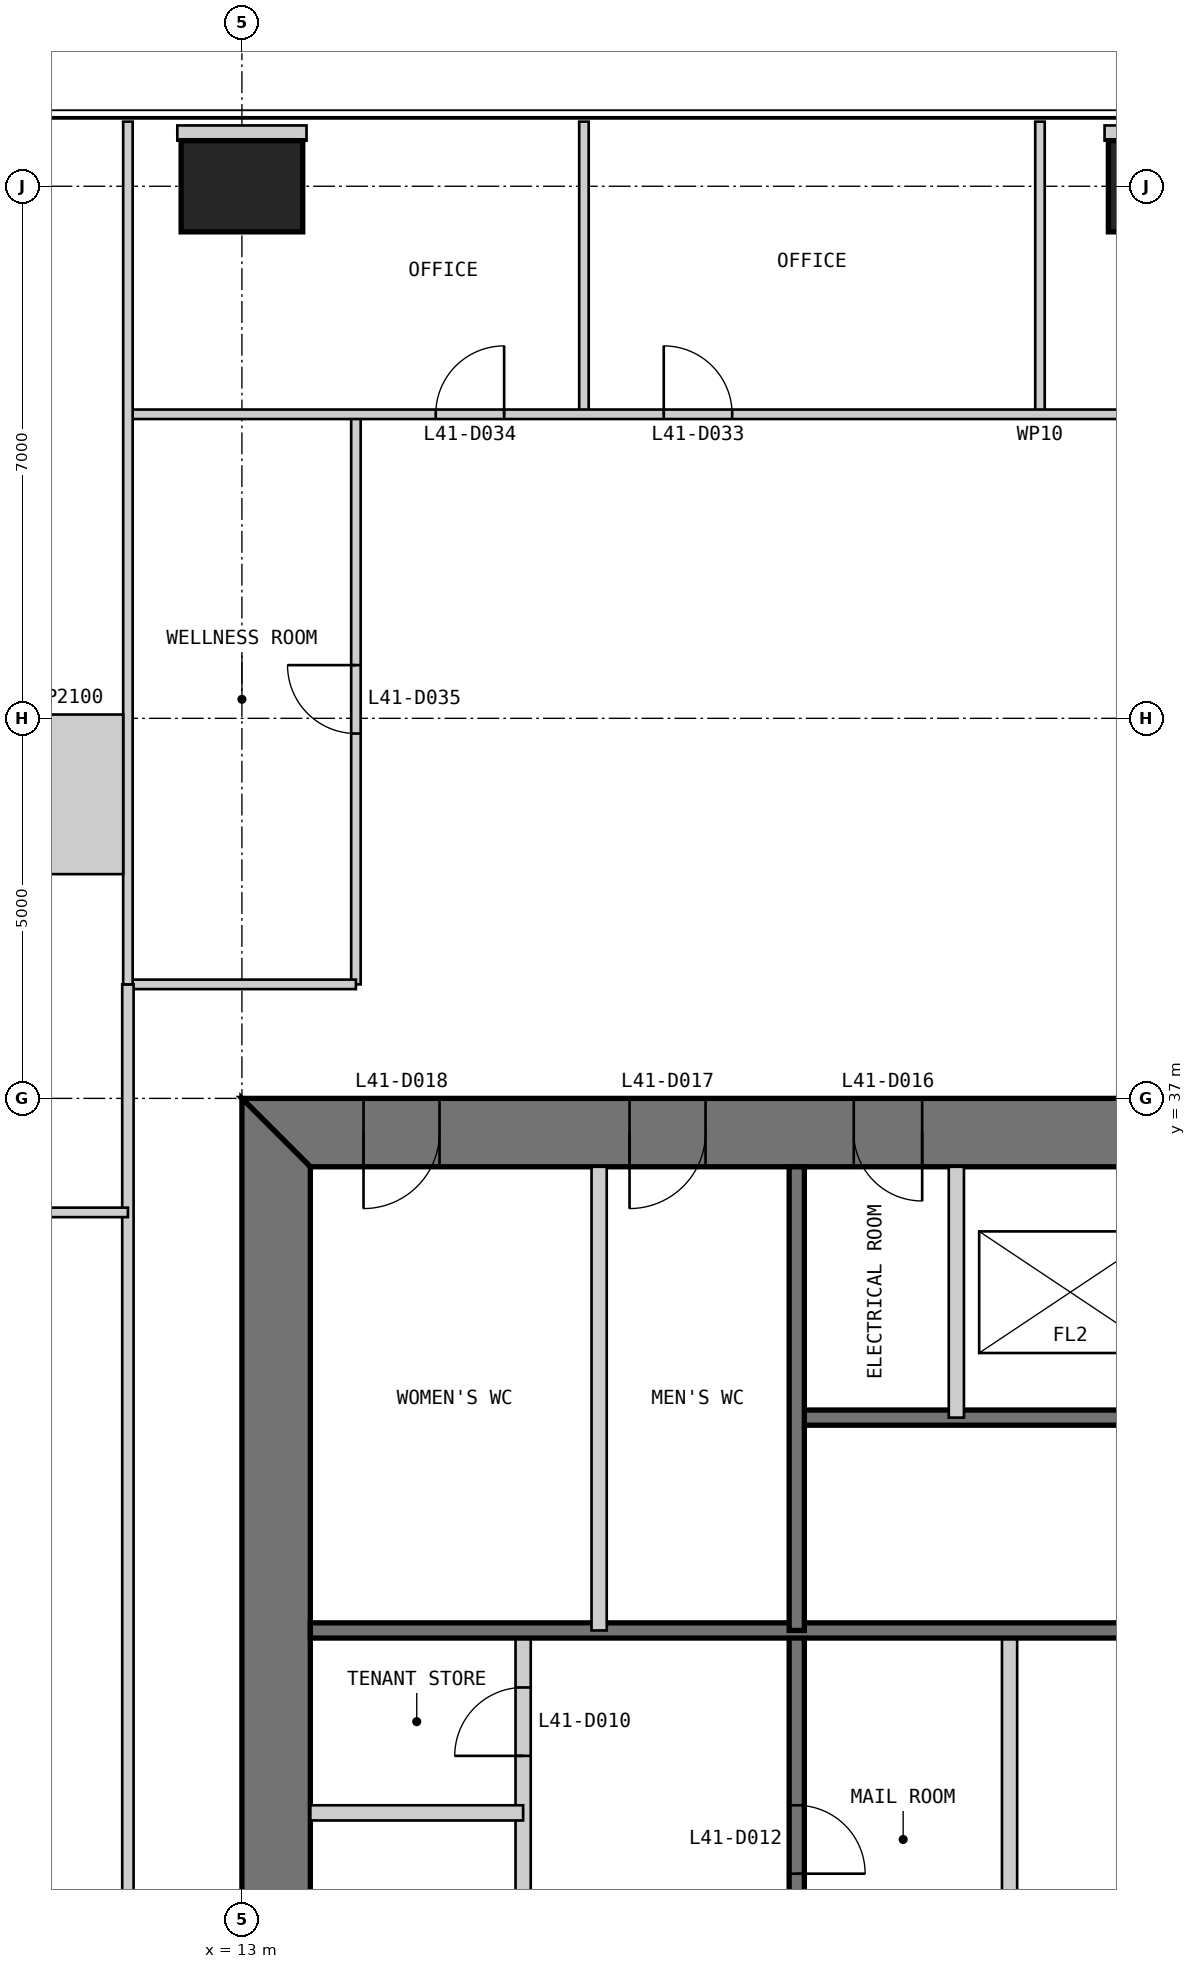
"""IFC4 building model, lengths in metres.
Left out: names, types, materials, properties, quantities, classifications, styles, units other than length and angle.
Written with IfcOpenShell. Run it as: python <this file> out.ifc"""

import sys

from ifc_helpers import new_model, si_unit, direction, frame, frame_2d, origin, origin_2d, place, context, subcontext, project, spatial, polyline, rectangle, outline, extrude, element, fill, save


model = new_model("IFC4")
c1 = context("Model", 3, precision=1e-05, world=origin(), true_north=direction((0.0, 1.0)))
c2 = subcontext(c1, "Body", "Model", "MODEL_VIEW")
j1 = project(units=[si_unit("LENGTHUNIT", "METRE"), si_unit("PLANEANGLEUNIT", "RADIAN")], contexts=[c1])
p1 = place(None, origin())
s1 = spatial("IfcSite", under=j1, at=p1, CompositionType="ELEMENT")
p2 = place(p1, origin())
s2 = spatial("IfcBuilding", under=s1, at=p2, CompositionType="ELEMENT")
p3 = place(p2, frame((0.0, 0.0, 177.8)))
s3 = spatial("IfcBuildingStorey", under=s2, at=p3, CompositionType="ELEMENT", Elevation=177.8)
p4 = place(p3, frame((25.0, 49.0, 0.0), z_axis=(0.0, 0.0, 1.0), x_axis=(1.0, 0.0, 0.0)))
e1 = element("IfcColumn", 1, at=p4, inside=s3, PredefinedType="COLUMN", context=c2, shape_type="SweptSolid", body=[
    extrude(rectangle(XDim=1.2, YDim=1.2, at=origin_2d()), origin(), (0.0, 0.0, 1.0), 4.0),
])
p5 = place(p3, frame((13.0, 49.0, 0.0), z_axis=(0.0, 0.0, 1.0), x_axis=(1.0, 0.0, 0.0)))
e2 = element("IfcColumn", 2, at=p5, inside=s3, PredefinedType="COLUMN", context=c2, shape_type="SweptSolid", body=[
    extrude(rectangle(XDim=1.6, YDim=1.2, at=origin_2d()), origin(), (0.0, 0.0, 1.0), 4.0),
])
p6 = place(p3, frame((37.0, 36.55, 0.0), z_axis=(0.0, 0.0, 1.0), x_axis=(-1.0, 0.0, 0.0)))
e3 = element("IfcWall", 3, at=p6, inside=s3, PredefinedType="SHEAR", context=c2, shape_type="SweptSolid", body=[
    extrude(outline(polyline([(0.0, -0.45), (24.0, -0.45), (23.1, 0.45), (0.9, 0.45), (0.0, -0.45)])), origin(), (0.0, 0.0, 1.0), 4.0),
])
p7 = place(p6, frame((4.9, 0.0, 0.0)))
e4 = element("IfcOpeningElement", 4, at=p7, cuts=e3, PredefinedType="OPENING", context=c2, shape_type="SweptSolid", body=[
    extrude(rectangle(XDim=1.0, YDim=2.2, at=frame_2d((0.5, 1.1))), frame((0.0, 0.46, 0.0), z_axis=(0.0, -1.0, 0.0), x_axis=(1.0, 0.0, 0.0)), (0.0, 0.0, 1.0), 0.92),
])
p8 = place(p6, frame((8.9, 0.0, 0.0)))
e5 = element("IfcOpeningElement", 5, at=p8, cuts=e3, PredefinedType="OPENING", context=c2, shape_type="SweptSolid", body=[
    extrude(rectangle(XDim=1.1, YDim=2.2, at=frame_2d((0.55, 1.1))), frame((0.0, 0.46, 0.0), z_axis=(0.0, -1.0, 0.0), x_axis=(1.0, 0.0, 0.0)), (0.0, 0.0, 1.0), 0.92),
])
p9 = place(p6, frame((15.05, 0.0, 0.0)))
e6 = element("IfcOpeningElement", 6, at=p9, cuts=e3, PredefinedType="OPENING", context=c2, shape_type="SweptSolid", body=[
    extrude(rectangle(XDim=0.9, YDim=2.2, at=frame_2d((0.45, 1.1))), frame((0.0, 0.46, 0.0), z_axis=(0.0, -1.0, 0.0), x_axis=(1.0, 0.0, 0.0)), (0.0, 0.0, 1.0), 0.92),
])
p10 = place(p6, frame((17.9, 0.0, 0.0)))
e7 = element("IfcOpeningElement", 7, at=p10, cuts=e3, PredefinedType="OPENING", context=c2, shape_type="SweptSolid", body=[
    extrude(rectangle(XDim=1.0, YDim=2.2, at=frame_2d((0.5, 1.1))), frame((0.0, 0.46, 0.0), z_axis=(0.0, -1.0, 0.0), x_axis=(1.0, 0.0, 0.0)), (0.0, 0.0, 1.0), 0.92),
])
p11 = place(p6, frame((21.4, 0.0, 0.0)))
e8 = element("IfcOpeningElement", 8, at=p11, cuts=e3, PredefinedType="OPENING", context=c2, shape_type="SweptSolid", body=[
    extrude(rectangle(XDim=1.0, YDim=2.2, at=frame_2d((0.5, 1.1))), frame((0.0, 0.46, 0.0), z_axis=(0.0, -1.0, 0.0), x_axis=(1.0, 0.0, 0.0)), (0.0, 0.0, 1.0), 0.92),
])
p12 = place(p3, frame((13.45, 36.1, 0.0), z_axis=(0.0, 0.0, 1.0), x_axis=(0.0, -1.0, 0.0)))
e9 = element("IfcWall", 9, at=p12, inside=s3, PredefinedType="SHEAR", context=c2, shape_type="SweptSolid", body=[
    extrude(outline(polyline([(-0.9, -0.45), (23.1, -0.45), (22.2, 0.45), (0.0, 0.45), (-0.9, -0.45)])), origin(), (0.0, 0.0, 1.0), 4.0),
])
p13 = place(p12, frame((20.2, 0.0, 0.0)))
e10 = element("IfcOpeningElement", 10, at=p13, cuts=e9, PredefinedType="OPENING", context=c2, shape_type="SweptSolid", body=[
    extrude(rectangle(XDim=1.0, YDim=2.2, at=frame_2d((0.5, 1.1))), frame((0.0, 0.46, 0.0), z_axis=(0.0, -1.0, 0.0), x_axis=(1.0, 0.0, 0.0)), (0.0, 0.0, 1.0), 0.92),
])
p14 = place(p12, frame((17.25, 0.0, 0.0)))
e11 = element("IfcOpeningElement", 11, at=p14, cuts=e9, PredefinedType="OPENING", context=c2, shape_type="SweptSolid", body=[
    extrude(rectangle(XDim=0.9, YDim=2.2, at=frame_2d((0.45, 1.1))), frame((0.0, 0.46, 0.0), z_axis=(0.0, -1.0, 0.0), x_axis=(1.0, 0.0, 0.0)), (0.0, 0.0, 1.0), 0.92),
])
p15 = place(p3, frame((16.7, 13.9, 0.0), z_axis=(0.0, 0.0, 1.0), x_axis=(0.0, 1.0, 0.0)))
e12 = element("IfcWall", 12, at=p15, inside=s3, PredefinedType="PARTITIONING", context=c2, shape_type="SweptSolid", body=[
    extrude(rectangle(XDim=16.1, YDim=0.2, at=frame_2d((8.05, 0.0))), origin(), (0.0, 0.0, 1.0), 3.8),
])
p16 = place(p15, frame((9.25, 0.0, 0.0)))
e13 = element("IfcOpeningElement", 13, at=p16, cuts=e12, PredefinedType="OPENING", context=c2, shape_type="SweptSolid", body=[
    extrude(rectangle(XDim=0.9, YDim=2.2, at=frame_2d((0.45, 1.1))), frame((0.0, 0.11, 0.0), z_axis=(0.0, -1.0, 0.0), x_axis=(1.0, 0.0, 0.0)), (0.0, 0.0, 1.0), 0.22),
])
p17 = place(p15, frame((14.45, 0.0, 0.0)))
e14 = element("IfcOpeningElement", 14, at=p17, cuts=e12, PredefinedType="OPENING", context=c2, shape_type="SweptSolid", body=[
    extrude(rectangle(XDim=0.9, YDim=2.2, at=frame_2d((0.45, 1.1))), frame((0.0, 0.11, 0.0), z_axis=(0.0, -1.0, 0.0), x_axis=(1.0, 0.0, 0.0)), (0.0, 0.0, 1.0), 0.22),
])
p18 = place(p3, frame((20.3, 13.9, 0.0), z_axis=(0.0, 0.0, 1.0), x_axis=(0.0, 1.0, 0.0)))
e15 = element("IfcWall", 15, at=p18, inside=s3, PredefinedType="SOLIDWALL", context=c2, shape_type="SweptSolid", body=[
    extrude(rectangle(XDim=16.1, YDim=0.2, at=frame_2d((8.05, 0.0))), origin(), (0.0, 0.0, 1.0), 3.8),
])
p19 = place(p18, frame((7.9, 0.0, 0.0)))
e16 = element("IfcOpeningElement", 16, at=p19, cuts=e15, PredefinedType="OPENING", context=c2, shape_type="SweptSolid", body=[
    extrude(rectangle(XDim=0.9, YDim=2.2, at=frame_2d((0.45, 1.1))), frame((0.0, 0.11, 0.0), z_axis=(0.0, -1.0, 0.0), x_axis=(1.0, 0.0, 0.0)), (0.0, 0.0, 1.0), 0.22),
])
p20 = place(p18, frame((12.9, 0.0, 0.0)))
e17 = element("IfcOpeningElement", 17, at=p20, cuts=e15, PredefinedType="OPENING", context=c2, shape_type="SweptSolid", body=[
    extrude(rectangle(XDim=0.9, YDim=2.2, at=frame_2d((0.45, 1.1))), frame((0.0, 0.11, 0.0), z_axis=(0.0, -1.0, 0.0), x_axis=(1.0, 0.0, 0.0)), (0.0, 0.0, 1.0), 0.22),
])
p21 = place(p3, frame((23.1, 20.0, 0.0), z_axis=(0.0, 0.0, 1.0), x_axis=(0.0, 1.0, 0.0)))
e18 = element("IfcWall", 18, at=p21, inside=s3, PredefinedType="PARTITIONING", context=c2, shape_type="SweptSolid", body=[
    extrude(rectangle(XDim=10.0, YDim=0.2, at=frame_2d((5.0, 0.0))), origin(), (0.0, 0.0, 1.0), 3.8),
])
p22 = place(p3, frame((13.9, 27.6, 0.0), z_axis=(0.0, 0.0, 1.0), x_axis=(1.0, 0.0, 0.0)))
e19 = element("IfcWall", 19, at=p22, inside=s3, PredefinedType="PARTITIONING", context=c2, shape_type="SweptSolid", body=[
    extrude(rectangle(XDim=2.8, YDim=0.2, at=frame_2d((1.4, 0.0))), origin(), (0.0, 0.0, 1.0), 3.8),
])
p23 = place(p3, frame((29.7, 32.8, 0.0), z_axis=(0.0, 0.0, 1.0), x_axis=(-1.0, 0.0, 0.0)))
e20 = element("IfcWall", 20, at=p23, inside=s3, PredefinedType="SOLIDWALL", context=c2, shape_type="SweptSolid", body=[
    extrude(rectangle(XDim=9.4, YDim=0.2, at=frame_2d((4.7, 0.0))), origin(), (0.0, 0.0, 1.0), 3.8),
])
p24 = place(p23, frame((0.25, 0.0, 0.0)))
e21 = element("IfcOpeningElement", 21, at=p24, cuts=e20, PredefinedType="OPENING", context=c2, shape_type="SweptSolid", body=[
    extrude(rectangle(XDim=1.0, YDim=2.2, at=frame_2d((0.5, 1.1))), frame((0.0, 0.11, 0.0), z_axis=(0.0, -1.0, 0.0), x_axis=(1.0, 0.0, 0.0)), (0.0, 0.0, 1.0), 0.22),
])
p25 = place(p3, frame((29.7, 30.0, 0.0), z_axis=(0.0, 0.0, 1.0), x_axis=(-1.0, 0.0, 0.0)))
e22 = element("IfcWall", 22, at=p25, inside=s3, PredefinedType="SOLIDWALL", context=c2, shape_type="SweptSolid", body=[
    extrude(rectangle(XDim=15.8, YDim=0.2, at=frame_2d((7.9, 0.0))), origin(), (0.0, 0.0, 1.0), 3.8),
])
p26 = place(p3, frame((22.4, 36.1, 0.0), z_axis=(0.0, 0.0, 1.0), x_axis=(0.0, -1.0, 0.0)))
e23 = element("IfcWall", 23, at=p26, inside=s3, PredefinedType="PARTITIONING", context=c2, shape_type="SweptSolid", body=[
    extrude(rectangle(XDim=3.3, YDim=0.2, at=frame_2d((1.65, 0.0))), origin(), (0.0, 0.0, 1.0), 3.8),
])
p27 = place(p3, frame((20.3, 36.1, 0.0), z_axis=(0.0, 0.0, 1.0), x_axis=(0.0, -1.0, 0.0)))
e24 = element("IfcWall", 24, at=p27, inside=s3, PredefinedType="SOLIDWALL", context=c2, shape_type="SweptSolid", body=[
    extrude(rectangle(XDim=6.1, YDim=0.2, at=frame_2d((3.05, 0.0))), origin(), (0.0, 0.0, 1.0), 3.8),
])
p28 = place(p3, frame((17.7, 36.1, 0.0), z_axis=(0.0, 0.0, 1.0), x_axis=(0.0, -1.0, 0.0)))
e25 = element("IfcWall", 25, at=p28, inside=s3, PredefinedType="PARTITIONING", context=c2, shape_type="SweptSolid", body=[
    extrude(rectangle(XDim=6.1, YDim=0.2, at=frame_2d((3.05, 0.0))), origin(), (0.0, 0.0, 1.0), 3.8),
])
for number, where, z_axis, x_axis in (
    (26, (23.5, 49.85, 0.0), (0.0, 0.0, 1.0), (0.0, -1.0, 0.0)),
    (27, (17.5, 49.85, 0.0), (0.0, 0.0, 1.0), (0.0, -1.0, 0.0)),
):
    element("IfcWall", number, at=place(p3, frame(where, z_axis=z_axis, x_axis=x_axis)), inside=s3, PredefinedType="PARTITIONING", context=c2, shape_type="SweptSolid", body=[
        extrude(rectangle(XDim=3.85, YDim=0.125, at=frame_2d((1.925, 0.0))), origin(), (0.0, 0.0, 1.0), 3.85),
    ])
p29 = place(p3, frame((14.5, 46.0, 0.0), z_axis=(0.0, 0.0, 1.0), x_axis=(0.0, -1.0, 0.0)))
e28 = element("IfcWall", 28, at=p29, inside=s3, PredefinedType="PARTITIONING", context=c2, shape_type="SweptSolid", body=[
    extrude(rectangle(XDim=7.5, YDim=0.125, at=frame_2d((3.75, 0.0))), origin(), (0.0, 0.0, 1.0), 3.85),
])
p30 = place(p29, frame((3.3, 0.0, 0.0)))
e29 = element("IfcOpeningElement", 29, at=p30, cuts=e28, PredefinedType="OPENING", context=c2, shape_type="SweptSolid", body=[
    extrude(rectangle(XDim=0.9, YDim=2.2, at=frame_2d((0.45, 1.1))), frame((0.0, 0.073, 0.0), z_axis=(0.0, -1.0, 0.0), x_axis=(1.0, 0.0, 0.0)), (0.0, 0.0, 1.0), 0.145),
])
p31 = place(p3, frame((35.5, 46.0, 0.0), z_axis=(0.0, 0.0, 1.0), x_axis=(-1.0, 0.0, 0.0)))
e30 = element("IfcWall", 30, at=p31, inside=s3, PredefinedType="PARTITIONING", context=c2, shape_type="SweptSolid", body=[
    extrude(rectangle(XDim=24.0, YDim=0.125, at=frame_2d((12.0, 0.0))), origin(), (0.0, 0.0, 1.0), 3.85),
])
p32 = place(p31, frame((16.05, 0.0, 0.0)))
e31 = element("IfcOpeningElement", 31, at=p32, cuts=e30, PredefinedType="OPENING", context=c2, shape_type="SweptSolid", body=[
    extrude(rectangle(XDim=0.9, YDim=2.2, at=frame_2d((0.45, 1.1))), frame((0.0, 0.073, 0.0), z_axis=(0.0, -1.0, 0.0), x_axis=(1.0, 0.0, 0.0)), (0.0, 0.0, 1.0), 0.145),
])
p33 = place(p31, frame((19.05, 0.0, 0.0)))
e32 = element("IfcOpeningElement", 32, at=p33, cuts=e30, PredefinedType="OPENING", context=c2, shape_type="SweptSolid", body=[
    extrude(rectangle(XDim=0.9, YDim=2.2, at=frame_2d((0.45, 1.1))), frame((0.0, 0.073, 0.0), z_axis=(0.0, -1.0, 0.0), x_axis=(1.0, 0.0, 0.0)), (0.0, 0.0, 1.0), 0.145),
])
p34 = place(p3, frame((14.5, 38.5, 0.0), z_axis=(0.0, 0.0, 1.0), x_axis=(-1.0, 0.0, 0.0)))
e33 = element("IfcWall", 33, at=p34, inside=s3, PredefinedType="PARTITIONING", context=c2, shape_type="SweptSolid", body=[
    extrude(rectangle(XDim=3.0, YDim=0.125, at=frame_2d((1.5, 0.0))), origin(), (0.0, 0.0, 1.0), 3.85),
])
p35 = place(p3, frame((11.5, 38.5, 0.0), z_axis=(0.0, 0.0, 1.0), x_axis=(0.0, -1.0, 0.0)))
e34 = element("IfcWall", 34, at=p35, inside=s3, PredefinedType="PARTITIONING", context=c2, shape_type="SweptSolid", body=[
    extrude(rectangle(XDim=27.0, YDim=0.15, at=frame_2d((13.5, 0.0))), origin(), (0.0, 0.0, 1.0), 3.85),
])
p36 = place(p35, frame((13.0, 0.0, 0.0)))
e35 = element("IfcOpeningElement", 35, at=p36, cuts=e34, PredefinedType="OPENING", context=c2, shape_type="SweptSolid", body=[
    extrude(rectangle(XDim=1.0, YDim=2.2, at=frame_2d((0.5, 1.1))), frame((0.0, 0.085, 0.0), z_axis=(0.0, -1.0, 0.0), x_axis=(1.0, 0.0, 0.0)), (0.0, 0.0, 1.0), 0.17),
])
p37 = place(p3, frame((11.5, 49.85, 0.0), z_axis=(0.0, 0.0, 1.0), x_axis=(0.0, -1.0, 0.0)))
e36 = element("IfcWall", 36, at=p37, inside=s3, PredefinedType="PARTITIONING", context=c2, shape_type="SweptSolid", body=[
    extrude(rectangle(XDim=11.35, YDim=0.125, at=frame_2d((5.675, 0.0))), origin(), (0.0, 0.0, 1.0), 3.85),
])
p38 = place(p3, frame((0.15, 35.5, 0.0), z_axis=(0.0, 0.0, 1.0), x_axis=(1.0, 0.0, 0.0)))
e37 = element("IfcWall", 37, at=p38, inside=s3, PredefinedType="PARTITIONING", context=c2, shape_type="SweptSolid", body=[
    extrude(rectangle(XDim=11.35, YDim=0.125, at=frame_2d((5.675, 0.0))), origin(), (0.0, 0.0, 1.0), 3.85),
])
p39 = place(p38, frame((7.1, 0.0, 0.0)))
e38 = element("IfcOpeningElement", 38, at=p39, cuts=e37, PredefinedType="OPENING", context=c2, shape_type="SweptSolid", body=[
    extrude(rectangle(XDim=1.0, YDim=2.2, at=frame_2d((0.5, 1.1))), frame((0.0, 0.073, 0.0), z_axis=(0.0, -1.0, 0.0), x_axis=(1.0, 0.0, 0.0)), (0.0, 0.0, 1.0), 0.145),
])
p40 = place(p3, frame((25.0, 49.8, 0.0), z_axis=(0.0, 0.0, 1.0), x_axis=(0.0, -1.0, 0.0)))
e39 = element("IfcWall", 39, at=p40, inside=s3, PredefinedType="PARTITIONING", context=c2, shape_type="SweptSolid", body=[
    extrude(rectangle(XDim=0.2, YDim=1.3, at=frame_2d((0.1, 0.0))), origin(), (0.0, 0.0, 1.0), 3.85),
])
p41 = place(p3, frame((13.0, 49.8, 0.0), z_axis=(0.0, 0.0, 1.0), x_axis=(0.0, -1.0, 0.0)))
e40 = element("IfcWall", 40, at=p41, inside=s3, PredefinedType="PARTITIONING", context=c2, shape_type="SweptSolid", body=[
    extrude(rectangle(XDim=0.2, YDim=1.7, at=frame_2d((0.1, 0.0))), origin(), (0.0, 0.0, 1.0), 3.85),
])
p42 = place(p3, frame((11.438, 41.0, 0.0), z_axis=(0.0, 0.0, 1.0), x_axis=(-1.0, 0.0, 0.0)))
e41 = element("IfcWall", 41, at=p42, inside=s3, PredefinedType="PARTITIONING", context=c2, shape_type="SweptSolid", body=[
    extrude(rectangle(XDim=1.438, YDim=2.1, at=frame_2d((0.719, 0.0))), origin(), (0.0, 0.0, 1.0), 3.85),
])
p43 = place(p17, origin())
e42 = element("IfcDoor", 42, at=p43, inside=s3, OperationType="SINGLE_SWING_LEFT", PredefinedType="DOOR", context=c2, shape_type="SweptSolid", body=[
    extrude(rectangle(XDim=0.9, YDim=2.2, at=frame_2d((0.45, 1.1))), frame((0.0, 0.025, 0.0), z_axis=(0.0, -1.0, 0.0), x_axis=(1.0, 0.0, 0.0)), (0.0, 0.0, 1.0), 0.05),
])
fill(e14, e42)
p44 = place(p20, frame((0.9, 0.0, 0.0), z_axis=(0.0, 0.0, 1.0), x_axis=(-1.0, 0.0, 0.0)))
e43 = element("IfcDoor", 43, at=p44, inside=s3, OperationType="SINGLE_SWING_RIGHT", PredefinedType="DOOR", context=c2, shape_type="SweptSolid", body=[
    extrude(rectangle(XDim=0.9, YDim=2.2, at=frame_2d((0.45, 1.1))), frame((0.0, 0.025, 0.0), z_axis=(0.0, -1.0, 0.0), x_axis=(1.0, 0.0, 0.0)), (0.0, 0.0, 1.0), 0.05),
])
fill(e17, e43)
p45 = place(p9, origin())
e44 = element("IfcDoor", 44, at=p45, inside=s3, OperationType="SINGLE_SWING_LEFT", PredefinedType="DOOR", context=c2, shape_type="SweptSolid", body=[
    extrude(rectangle(XDim=0.9, YDim=2.2, at=frame_2d((0.45, 1.1))), frame((0.0, 0.025, 0.0), z_axis=(0.0, -1.0, 0.0), x_axis=(1.0, 0.0, 0.0)), (0.0, 0.0, 1.0), 0.05),
    extrude(outline(polyline([(0.0, 0.0), (0.04, 0.0), (0.04, 2.16), (0.86, 2.16), (0.86, 0.0), (0.9, 0.0), (0.9, 2.2), (0.0, 2.2), (0.0, 0.0)])), frame((0.0, 0.3, 0.0), z_axis=(0.0, -1.0, 0.0), x_axis=(1.0, 0.0, 0.0)), (0.0, 0.0, 1.0), 0.6),
])
fill(e6, e44)
p46 = place(p10, origin())
e45 = element("IfcDoor", 45, at=p46, inside=s3, OperationType="SINGLE_SWING_RIGHT", PredefinedType="DOOR", context=c2, shape_type="SweptSolid", body=[
    extrude(rectangle(XDim=1.0, YDim=2.2, at=frame_2d((0.5, 1.1))), frame((0.0, 0.025, 0.0), z_axis=(0.0, -1.0, 0.0), x_axis=(1.0, 0.0, 0.0)), (0.0, 0.0, 1.0), 0.05),
    extrude(outline(polyline([(0.0, 0.0), (0.04, 0.0), (0.04, 2.16), (0.96, 2.16), (0.96, 0.0), (1.0, 0.0), (1.0, 2.2), (0.0, 2.2), (0.0, 0.0)])), frame((0.0, 0.3, 0.0), z_axis=(0.0, -1.0, 0.0), x_axis=(1.0, 0.0, 0.0)), (0.0, 0.0, 1.0), 0.6),
])
fill(e7, e45)
p47 = place(p11, origin())
e46 = element("IfcDoor", 46, at=p47, inside=s3, OperationType="SINGLE_SWING_RIGHT", PredefinedType="DOOR", context=c2, shape_type="SweptSolid", body=[
    extrude(rectangle(XDim=1.0, YDim=2.2, at=frame_2d((0.5, 1.1))), frame((0.0, 0.025, 0.0), z_axis=(0.0, -1.0, 0.0), x_axis=(1.0, 0.0, 0.0)), (0.0, 0.0, 1.0), 0.05),
    extrude(outline(polyline([(0.0, 0.0), (0.04, 0.0), (0.04, 2.16), (0.96, 2.16), (0.96, 0.0), (1.0, 0.0), (1.0, 2.2), (0.0, 2.2), (0.0, 0.0)])), frame((0.0, 0.3, 0.0), z_axis=(0.0, -1.0, 0.0), x_axis=(1.0, 0.0, 0.0)), (0.0, 0.0, 1.0), 0.6),
])
fill(e8, e46)
p48 = place(p32, frame((0.9, 0.0, 0.0), z_axis=(0.0, 0.0, 1.0), x_axis=(-1.0, 0.0, 0.0)))
e47 = element("IfcDoor", 47, at=p48, inside=s3, OperationType="SINGLE_SWING_LEFT", PredefinedType="DOOR", context=c2, shape_type="SweptSolid", body=[
    extrude(rectangle(XDim=0.9, YDim=2.2, at=frame_2d((0.45, 1.1))), frame((0.0, 0.025, 0.0), z_axis=(0.0, -1.0, 0.0), x_axis=(1.0, 0.0, 0.0)), (0.0, 0.0, 1.0), 0.05),
])
fill(e31, e47)
p49 = place(p33, frame((0.9, 0.0, 0.0), z_axis=(0.0, 0.0, 1.0), x_axis=(-1.0, 0.0, 0.0)))
e48 = element("IfcDoor", 48, at=p49, inside=s3, OperationType="SINGLE_SWING_RIGHT", PredefinedType="DOOR", context=c2, shape_type="SweptSolid", body=[
    extrude(rectangle(XDim=0.9, YDim=2.2, at=frame_2d((0.45, 1.1))), frame((0.0, 0.025, 0.0), z_axis=(0.0, -1.0, 0.0), x_axis=(1.0, 0.0, 0.0)), (0.0, 0.0, 1.0), 0.05),
])
fill(e32, e48)
p50 = place(p30, frame((0.9, 0.0, 0.0), z_axis=(0.0, 0.0, 1.0), x_axis=(-1.0, 0.0, 0.0)))
e49 = element("IfcDoor", 49, at=p50, inside=s3, OperationType="SINGLE_SWING_RIGHT", PredefinedType="DOOR", context=c2, shape_type="SweptSolid", body=[
    extrude(rectangle(XDim=0.9, YDim=2.2, at=frame_2d((0.45, 1.1))), frame((0.0, 0.025, 0.0), z_axis=(0.0, -1.0, 0.0), x_axis=(1.0, 0.0, 0.0)), (0.0, 0.0, 1.0), 0.05),
])
fill(e29, e49)
save(model, sys.argv[1])
